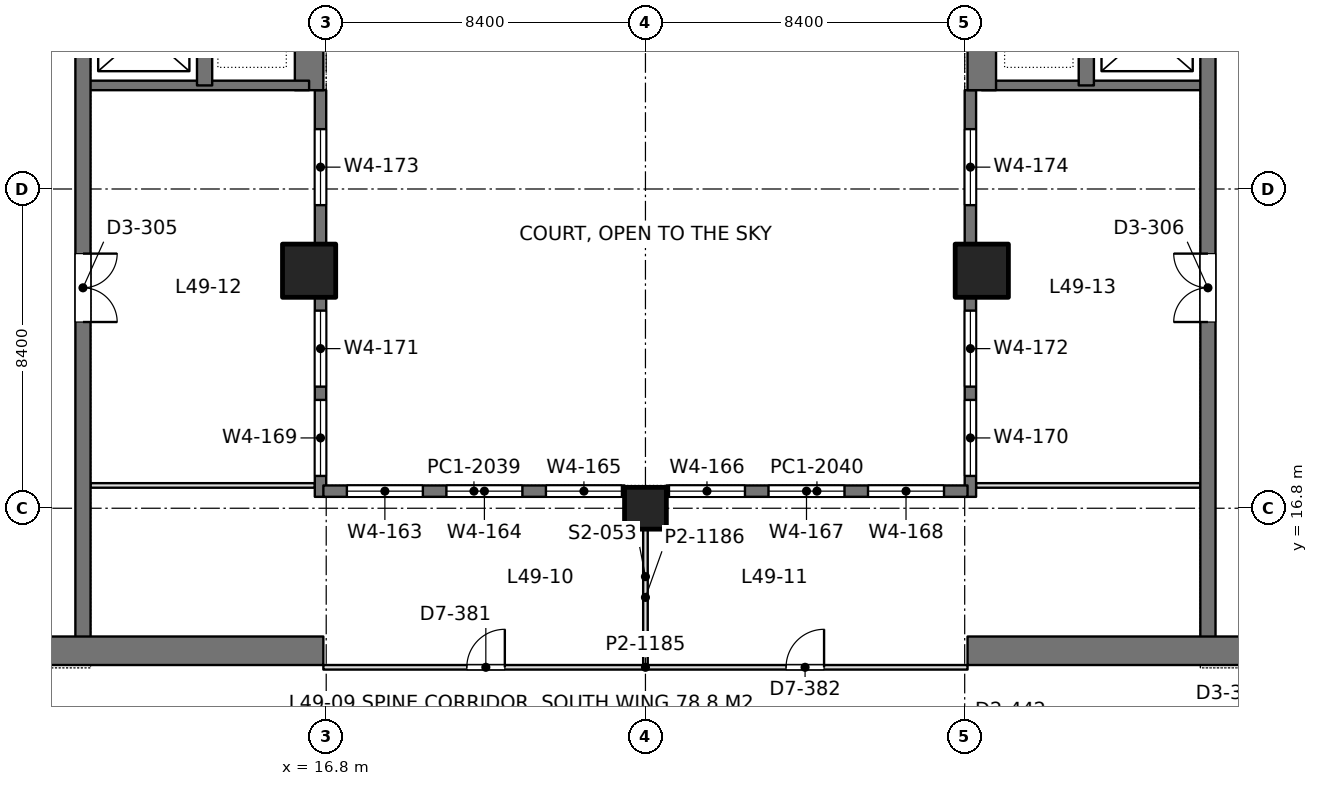
"""IFC4 building model, lengths in metres.
Left out: names, types, materials, properties, quantities, classifications, styles, units other than length and angle.
Written with IfcOpenShell. Run it as: python <this file> out.ifc"""

import sys

from ifc_helpers import new_model, si_unit, direction, frame, frame_2d, origin, origin_2d, place, context, subcontext, project, spatial, rectangle, extrude, element, fill, save


model = new_model("IFC4")
c1 = context("Model", 3, precision=1e-05, world=origin(), true_north=direction((0.0, 1.0)))
c2 = subcontext(c1, "Body", "Model", "MODEL_VIEW")
j1 = project(units=[si_unit("LENGTHUNIT", "METRE"), si_unit("PLANEANGLEUNIT", "RADIAN")], contexts=[c1])
p1 = place(None, origin())
s1 = spatial("IfcSite", under=j1, at=p1, CompositionType="ELEMENT")
p2 = place(p1, origin())
s2 = spatial("IfcBuilding", under=s1, at=p2, CompositionType="ELEMENT")
p3 = place(p2, frame((0.0, 0.0, 215.4)))
s3 = spatial("IfcBuildingStorey", under=s2, at=p3, CompositionType="ELEMENT", Elevation=215.4)
p4 = place(p3, frame((25.2, 16.8, 0.0), z_axis=(0.0, 0.0, 1.0), x_axis=(1.0, 0.0, 0.0)))
e1 = element("IfcColumn", 1, at=p4, inside=s3, PredefinedType="COLUMN", context=c2, shape_type="SweptSolid", body=[
    extrude(rectangle(XDim=1.1, YDim=1.1, at=origin_2d()), origin(), (0.0, 0.0, 1.0), 4.2),
])
for number, where, z_axis, x_axis in (
    (2, (16.35, 23.05, 0.0), (0.0, 0.0, 1.0), (1.0, 0.0, 0.0)),
    (3, (34.05, 23.05, 0.0), (0.0, 0.0, 1.0), (1.0, 0.0, 0.0)),
):
    element("IfcColumn", number, at=place(p3, frame(where, z_axis=z_axis, x_axis=x_axis)), inside=s3, PredefinedType="COLUMN", context=c2, shape_type="SweptSolid", body=[
        extrude(rectangle(XDim=1.4, YDim=1.4, at=origin_2d()), origin(), (0.0, 0.0, 1.0), 4.2),
    ])
p5 = place(p3, frame((-1.125, 13.05, 0.0), z_axis=(0.0, 0.0, 1.0), x_axis=(1.0, 0.0, 0.0)))
e4 = element("IfcWall", 4, at=p5, inside=s3, PredefinedType="SHEAR", context=c2, shape_type="SweptSolid", body=[
    extrude(rectangle(XDim=17.85, YDim=0.75, at=frame_2d((8.925, 0.0))), origin(), (0.0, 0.0, 1.0), 4.2),
])
p6 = place(p5, frame((8.875, 0.0, 0.0)))
e5 = element("IfcOpeningElement", 5, at=p6, cuts=e4, PredefinedType="OPENING", context=c2, shape_type="SweptSolid", body=[
    extrude(rectangle(XDim=1.8, YDim=2.4, at=frame_2d((0.9, 1.2))), frame((0.0, 0.385, 0.0), z_axis=(0.0, -1.0, 0.0), x_axis=(1.0, 0.0, 0.0)), (0.0, 0.0, 1.0), 0.77),
])
p7 = place(p3, frame((16.35, 27.8, 0.0), z_axis=(0.0, 0.0, 1.0), x_axis=(0.0, 1.0, 0.0)))
e6 = element("IfcWall", 6, at=p7, inside=s3, PredefinedType="SHEAR", context=c2, shape_type="SweptSolid", body=[
    extrude(rectangle(XDim=9.55, YDim=0.75, at=frame_2d((4.775, 0.0))), origin(), (0.0, 0.0, 1.0), 4.2),
])
p8 = place(p3, frame((10.4, 13.05, 0.0), z_axis=(0.0, 0.0, 1.0), x_axis=(0.0, 1.0, 0.0)))
e7 = element("IfcWall", 7, at=p8, inside=s3, PredefinedType="SHEAR", context=c2, shape_type="SweptSolid", body=[
    extrude(rectangle(XDim=24.3, YDim=0.4, at=frame_2d((12.15, 0.0))), origin(), (0.0, 0.0, 1.0), 4.2),
])
p9 = place(p8, frame((15.75, 0.0, 0.0)))
e8 = element("IfcOpeningElement", 8, at=p9, cuts=e7, PredefinedType="OPENING", context=c2, shape_type="SweptSolid", body=[
    extrude(rectangle(XDim=1.1, YDim=2.2, at=frame_2d((0.55, 1.1))), frame((0.0, 0.21, 0.0), z_axis=(0.0, -1.0, 0.0), x_axis=(1.0, 0.0, 0.0)), (0.0, 0.0, 1.0), 0.42),
])
p10 = place(p8, frame((18.6, 0.0, 0.0)))
e9 = element("IfcOpeningElement", 9, at=p10, cuts=e7, PredefinedType="OPENING", context=c2, shape_type="SweptSolid", body=[
    extrude(rectangle(XDim=1.1, YDim=2.2, at=frame_2d((0.55, 1.1))), frame((0.0, 0.21, 0.0), z_axis=(0.0, -1.0, 0.0), x_axis=(1.0, 0.0, 0.0)), (0.0, 0.0, 1.0), 0.42),
])
p11 = place(p8, frame((21.45, 0.0, 0.0)))
e10 = element("IfcOpeningElement", 10, at=p11, cuts=e7, PredefinedType="OPENING", context=c2, shape_type="SweptSolid", body=[
    extrude(rectangle(XDim=1.1, YDim=2.2, at=frame_2d((0.55, 1.1))), frame((0.0, 0.21, 0.0), z_axis=(0.0, -1.0, 0.0), x_axis=(1.0, 0.0, 0.0)), (0.0, 0.0, 1.0), 0.42),
])
p12 = place(p8, frame((8.65, 0.0, 0.0)))
e11 = element("IfcOpeningElement", 11, at=p12, cuts=e7, PredefinedType="OPENING", context=c2, shape_type="SweptSolid", body=[
    extrude(rectangle(XDim=1.8, YDim=2.4, at=frame_2d((0.9, 1.2))), frame((0.0, 0.21, 0.0), z_axis=(0.0, -1.0, 0.0), x_axis=(1.0, 0.0, 0.0)), (0.0, 0.0, 1.0), 0.42),
])
p13 = place(p3, frame((13.6, 27.925, 0.0), z_axis=(0.0, 0.0, 1.0), x_axis=(0.0, 1.0, 0.0)))
e12 = element("IfcWall", 12, at=p13, inside=s3, PredefinedType="SHEAR", context=c2, shape_type="SweptSolid", body=[
    extrude(rectangle(XDim=9.425, YDim=0.4, at=frame_2d((4.712, 0.0))), origin(), (0.0, 0.0, 1.0), 4.2),
])
p14 = place(p3, frame((10.4, 27.925, 0.0), z_axis=(0.0, 0.0, 1.0), x_axis=(1.0, 0.0, 0.0)))
e13 = element("IfcWall", 13, at=p14, inside=s3, PredefinedType="SHEAR", context=c2, shape_type="SweptSolid", body=[
    extrude(rectangle(XDim=5.95, YDim=0.25, at=frame_2d((2.975, 0.0))), origin(), (0.0, 0.0, 1.0), 4.2),
])
p15 = place(p3, frame((33.675, 13.05, 0.0), z_axis=(0.0, 0.0, 1.0), x_axis=(1.0, 0.0, 0.0)))
e14 = element("IfcWall", 14, at=p15, inside=s3, PredefinedType="SHEAR", context=c2, shape_type="SweptSolid", body=[
    extrude(rectangle(XDim=17.85, YDim=0.75, at=frame_2d((8.925, 0.0))), origin(), (0.0, 0.0, 1.0), 4.2),
])
p16 = place(p15, frame((7.175, 0.0, 0.0)))
e15 = element("IfcOpeningElement", 15, at=p16, cuts=e14, PredefinedType="OPENING", context=c2, shape_type="SweptSolid", body=[
    extrude(rectangle(XDim=1.8, YDim=2.4, at=frame_2d((0.9, 1.2))), frame((0.0, 0.385, 0.0), z_axis=(0.0, -1.0, 0.0), x_axis=(1.0, 0.0, 0.0)), (0.0, 0.0, 1.0), 0.77),
])
p17 = place(p3, frame((34.05, 27.8, 0.0), z_axis=(0.0, 0.0, 1.0), x_axis=(0.0, 1.0, 0.0)))
e16 = element("IfcWall", 16, at=p17, inside=s3, PredefinedType="SHEAR", context=c2, shape_type="SweptSolid", body=[
    extrude(rectangle(XDim=9.55, YDim=0.75, at=frame_2d((4.775, 0.0))), origin(), (0.0, 0.0, 1.0), 4.2),
])
p18 = place(p3, frame((40.0, 13.05, 0.0), z_axis=(0.0, 0.0, 1.0), x_axis=(0.0, 1.0, 0.0)))
e17 = element("IfcWall", 17, at=p18, inside=s3, PredefinedType="SHEAR", context=c2, shape_type="SweptSolid", body=[
    extrude(rectangle(XDim=24.3, YDim=0.4, at=frame_2d((12.15, 0.0))), origin(), (0.0, 0.0, 1.0), 4.2),
])
p19 = place(p18, frame((15.75, 0.0, 0.0)))
e18 = element("IfcOpeningElement", 18, at=p19, cuts=e17, PredefinedType="OPENING", context=c2, shape_type="SweptSolid", body=[
    extrude(rectangle(XDim=1.1, YDim=2.2, at=frame_2d((0.55, 1.1))), frame((0.0, 0.21, 0.0), z_axis=(0.0, -1.0, 0.0), x_axis=(1.0, 0.0, 0.0)), (0.0, 0.0, 1.0), 0.42),
])
p20 = place(p18, frame((18.6, 0.0, 0.0)))
e19 = element("IfcOpeningElement", 19, at=p20, cuts=e17, PredefinedType="OPENING", context=c2, shape_type="SweptSolid", body=[
    extrude(rectangle(XDim=1.1, YDim=2.2, at=frame_2d((0.55, 1.1))), frame((0.0, 0.21, 0.0), z_axis=(0.0, -1.0, 0.0), x_axis=(1.0, 0.0, 0.0)), (0.0, 0.0, 1.0), 0.42),
])
p21 = place(p18, frame((21.45, 0.0, 0.0)))
e20 = element("IfcOpeningElement", 20, at=p21, cuts=e17, PredefinedType="OPENING", context=c2, shape_type="SweptSolid", body=[
    extrude(rectangle(XDim=1.1, YDim=2.2, at=frame_2d((0.55, 1.1))), frame((0.0, 0.21, 0.0), z_axis=(0.0, -1.0, 0.0), x_axis=(1.0, 0.0, 0.0)), (0.0, 0.0, 1.0), 0.42),
])
p22 = place(p18, frame((8.65, 0.0, 0.0)))
e21 = element("IfcOpeningElement", 21, at=p22, cuts=e17, PredefinedType="OPENING", context=c2, shape_type="SweptSolid", body=[
    extrude(rectangle(XDim=1.8, YDim=2.4, at=frame_2d((0.9, 1.2))), frame((0.0, 0.21, 0.0), z_axis=(0.0, -1.0, 0.0), x_axis=(1.0, 0.0, 0.0)), (0.0, 0.0, 1.0), 0.42),
])
p23 = place(p3, frame((36.8, 27.925, 0.0), z_axis=(0.0, 0.0, 1.0), x_axis=(0.0, 1.0, 0.0)))
e22 = element("IfcWall", 22, at=p23, inside=s3, PredefinedType="SHEAR", context=c2, shape_type="SweptSolid", body=[
    extrude(rectangle(XDim=9.425, YDim=0.4, at=frame_2d((4.712, 0.0))), origin(), (0.0, 0.0, 1.0), 4.2),
])
p24 = place(p3, frame((40.0, 27.925, 0.0), z_axis=(0.0, 0.0, 1.0), x_axis=(-1.0, 0.0, 0.0)))
e23 = element("IfcWall", 23, at=p24, inside=s3, PredefinedType="SHEAR", context=c2, shape_type="SweptSolid", body=[
    extrude(rectangle(XDim=5.95, YDim=0.25, at=frame_2d((2.975, 0.0))), origin(), (0.0, 0.0, 1.0), 4.2),
])
p25 = place(p3, frame((16.65, 17.1, 0.0), z_axis=(0.0, 0.0, 1.0), x_axis=(0.0, 1.0, 0.0)))
e24 = element("IfcWall", 24, at=p25, inside=s3, PredefinedType="SOLIDWALL", context=c2, shape_type="SweptSolid", body=[
    extrude(rectangle(XDim=10.7, YDim=0.3, at=frame_2d((5.35, 0.0))), origin(), (0.0, 0.0, 1.0), 4.05),
])
p26 = place(p25, frame((0.55, 0.0, 0.9)))
e25 = element("IfcOpeningElement", 25, at=p26, cuts=e24, PredefinedType="OPENING", context=c2, shape_type="SweptSolid", body=[
    extrude(rectangle(XDim=2.0, YDim=1.9, at=frame_2d((1.0, 0.95))), frame((0.0, 0.16, 0.0), z_axis=(0.0, -1.0, 0.0), x_axis=(1.0, 0.0, 0.0)), (0.0, 0.0, 1.0), 0.32),
])
p27 = place(p25, frame((2.9, 0.0, 0.9)))
e26 = element("IfcOpeningElement", 26, at=p27, cuts=e24, PredefinedType="OPENING", context=c2, shape_type="SweptSolid", body=[
    extrude(rectangle(XDim=2.0, YDim=1.9, at=frame_2d((1.0, 0.95))), frame((0.0, 0.16, 0.0), z_axis=(0.0, -1.0, 0.0), x_axis=(1.0, 0.0, 0.0)), (0.0, 0.0, 1.0), 0.32),
])
p28 = place(p25, frame((7.675, 0.0, 0.9)))
e27 = element("IfcOpeningElement", 27, at=p28, cuts=e24, PredefinedType="OPENING", context=c2, shape_type="SweptSolid", body=[
    extrude(rectangle(XDim=2.0, YDim=1.9, at=frame_2d((1.0, 0.95))), frame((0.0, 0.16, 0.0), z_axis=(0.0, -1.0, 0.0), x_axis=(1.0, 0.0, 0.0)), (0.0, 0.0, 1.0), 0.32),
])
p29 = place(p3, frame((33.75, 17.1, 0.0), z_axis=(0.0, 0.0, 1.0), x_axis=(0.0, 1.0, 0.0)))
e28 = element("IfcWall", 28, at=p29, inside=s3, PredefinedType="SOLIDWALL", context=c2, shape_type="SweptSolid", body=[
    extrude(rectangle(XDim=10.7, YDim=0.3, at=frame_2d((5.35, 0.0))), origin(), (0.0, 0.0, 1.0), 4.05),
])
p30 = place(p29, frame((0.55, 0.0, 0.9)))
e29 = element("IfcOpeningElement", 29, at=p30, cuts=e28, PredefinedType="OPENING", context=c2, shape_type="SweptSolid", body=[
    extrude(rectangle(XDim=2.0, YDim=1.9, at=frame_2d((1.0, 0.95))), frame((0.0, 0.16, 0.0), z_axis=(0.0, -1.0, 0.0), x_axis=(1.0, 0.0, 0.0)), (0.0, 0.0, 1.0), 0.32),
])
p31 = place(p29, frame((2.9, 0.0, 0.9)))
e30 = element("IfcOpeningElement", 30, at=p31, cuts=e28, PredefinedType="OPENING", context=c2, shape_type="SweptSolid", body=[
    extrude(rectangle(XDim=2.0, YDim=1.9, at=frame_2d((1.0, 0.95))), frame((0.0, 0.16, 0.0), z_axis=(0.0, -1.0, 0.0), x_axis=(1.0, 0.0, 0.0)), (0.0, 0.0, 1.0), 0.32),
])
p32 = place(p29, frame((7.675, 0.0, 0.9)))
e31 = element("IfcOpeningElement", 31, at=p32, cuts=e28, PredefinedType="OPENING", context=c2, shape_type="SweptSolid", body=[
    extrude(rectangle(XDim=2.0, YDim=1.9, at=frame_2d((1.0, 0.95))), frame((0.0, 0.16, 0.0), z_axis=(0.0, -1.0, 0.0), x_axis=(1.0, 0.0, 0.0)), (0.0, 0.0, 1.0), 0.32),
])
p33 = place(p3, frame((16.725, 17.25, 0.0), z_axis=(0.0, 0.0, 1.0), x_axis=(1.0, 0.0, 0.0)))
e32 = element("IfcWall", 32, at=p33, inside=s3, PredefinedType="SOLIDWALL", context=c2, shape_type="SweptSolid", body=[
    extrude(rectangle(XDim=7.925, YDim=0.3, at=frame_2d((3.962, 0.0))), origin(), (0.0, 0.0, 1.0), 4.05),
])
p34 = place(p33, frame((0.619, 0.0, 0.9)))
e33 = element("IfcOpeningElement", 33, at=p34, cuts=e32, PredefinedType="OPENING", context=c2, shape_type="SweptSolid", body=[
    extrude(rectangle(XDim=2.0, YDim=1.9, at=frame_2d((1.0, 0.95))), frame((0.0, 0.16, 0.0), z_axis=(0.0, -1.0, 0.0), x_axis=(1.0, 0.0, 0.0)), (0.0, 0.0, 1.0), 0.32),
])
p35 = place(p33, frame((3.238, 0.0, 0.9)))
e34 = element("IfcOpeningElement", 34, at=p35, cuts=e32, PredefinedType="OPENING", context=c2, shape_type="SweptSolid", body=[
    extrude(rectangle(XDim=2.0, YDim=1.9, at=frame_2d((1.0, 0.95))), frame((0.0, 0.16, 0.0), z_axis=(0.0, -1.0, 0.0), x_axis=(1.0, 0.0, 0.0)), (0.0, 0.0, 1.0), 0.32),
])
p36 = place(p33, frame((5.856, 0.0, 0.9)))
e35 = element("IfcOpeningElement", 35, at=p36, cuts=e32, PredefinedType="OPENING", context=c2, shape_type="SweptSolid", body=[
    extrude(rectangle(XDim=2.0, YDim=1.9, at=frame_2d((1.0, 0.95))), frame((0.0, 0.16, 0.0), z_axis=(0.0, -1.0, 0.0), x_axis=(1.0, 0.0, 0.0)), (0.0, 0.0, 1.0), 0.32),
])
p37 = place(p3, frame((25.75, 17.25, 0.0), z_axis=(0.0, 0.0, 1.0), x_axis=(1.0, 0.0, 0.0)))
e36 = element("IfcWall", 36, at=p37, inside=s3, PredefinedType="SOLIDWALL", context=c2, shape_type="SweptSolid", body=[
    extrude(rectangle(XDim=7.925, YDim=0.3, at=frame_2d((3.962, 0.0))), origin(), (0.0, 0.0, 1.0), 4.05),
])
p38 = place(p37, frame((0.069, 0.0, 0.9)))
e37 = element("IfcOpeningElement", 37, at=p38, cuts=e36, PredefinedType="OPENING", context=c2, shape_type="SweptSolid", body=[
    extrude(rectangle(XDim=2.0, YDim=1.9, at=frame_2d((1.0, 0.95))), frame((0.0, 0.16, 0.0), z_axis=(0.0, -1.0, 0.0), x_axis=(1.0, 0.0, 0.0)), (0.0, 0.0, 1.0), 0.32),
])
p39 = place(p37, frame((2.688, 0.0, 0.9)))
e38 = element("IfcOpeningElement", 38, at=p39, cuts=e36, PredefinedType="OPENING", context=c2, shape_type="SweptSolid", body=[
    extrude(rectangle(XDim=2.0, YDim=1.9, at=frame_2d((1.0, 0.95))), frame((0.0, 0.16, 0.0), z_axis=(0.0, -1.0, 0.0), x_axis=(1.0, 0.0, 0.0)), (0.0, 0.0, 1.0), 0.32),
])
p40 = place(p37, frame((5.306, 0.0, 0.9)))
e39 = element("IfcOpeningElement", 39, at=p40, cuts=e36, PredefinedType="OPENING", context=c2, shape_type="SweptSolid", body=[
    extrude(rectangle(XDim=2.0, YDim=1.9, at=frame_2d((1.0, 0.95))), frame((0.0, 0.16, 0.0), z_axis=(0.0, -1.0, 0.0), x_axis=(1.0, 0.0, 0.0)), (0.0, 0.0, 1.0), 0.32),
])
for number, where, z_axis, x_axis in (
    (40, (10.598, 17.4, 0.0), (0.0, 0.0, 1.0), (1.0, 0.0, 0.0)),
    (41, (33.898, 17.4, 0.0), (0.0, 0.0, 1.0), (1.0, 0.0, 0.0)),
):
    element("IfcWall", number, at=place(p3, frame(where, z_axis=z_axis, x_axis=x_axis)), inside=s3, PredefinedType="PARTITIONING", context=c2, shape_type="SweptSolid", body=[
        extrude(rectangle(XDim=5.904, YDim=0.12, at=frame_2d((2.952, 0.0))), origin(), (0.0, 0.0, 1.0), 3.55),
    ])
p41 = place(p3, frame((25.2, 12.658, 0.0), z_axis=(0.0, 0.0, 1.0), x_axis=(0.0, 1.0, 0.0)))
e42 = element("IfcWall", 42, at=p41, inside=s3, PredefinedType="PARTITIONING", context=c2, shape_type="SweptSolid", body=[
    extrude(rectangle(XDim=3.593, YDim=0.12, at=frame_2d((1.796, 0.0))), origin(), (0.0, 0.0, 1.0), 3.55),
])
p42 = place(p3, frame((16.725, 12.615, 0.0), z_axis=(0.0, 0.0, 1.0), x_axis=(1.0, 0.0, 0.0)))
e43 = element("IfcWall", 43, at=p42, inside=s3, PredefinedType="PARTITIONING", context=c2, shape_type="SweptSolid", body=[
    extrude(rectangle(XDim=16.95, YDim=0.12, at=frame_2d((8.475, 0.0))), origin(), (0.0, 0.0, 1.0), 3.55),
])
p43 = place(p42, frame((3.775, 0.0, 0.0)))
e44 = element("IfcOpeningElement", 44, at=p43, cuts=e43, PredefinedType="OPENING", context=c2, shape_type="SweptSolid", body=[
    extrude(rectangle(XDim=1.0, YDim=2.4, at=frame_2d((0.5, 1.2))), frame((0.0, 0.07, 0.0), z_axis=(0.0, -1.0, 0.0), x_axis=(1.0, 0.0, 0.0)), (0.0, 0.0, 1.0), 0.14),
])
p44 = place(p42, frame((12.175, 0.0, 0.0)))
e45 = element("IfcOpeningElement", 45, at=p44, cuts=e43, PredefinedType="OPENING", context=c2, shape_type="SweptSolid", body=[
    extrude(rectangle(XDim=1.0, YDim=2.4, at=frame_2d((0.5, 1.2))), frame((0.0, 0.07, 0.0), z_axis=(0.0, -1.0, 0.0), x_axis=(1.0, 0.0, 0.0)), (0.0, 0.0, 1.0), 0.14),
])
p45 = place(p26, origin())
e46 = element("IfcWindow", 46, at=p45, inside=s3, PartitioningType="SINGLE_PANEL", PredefinedType="WINDOW", context=c2, shape_type="SweptSolid", body=[
    extrude(rectangle(XDim=2.0, YDim=1.9, at=frame_2d((1.0, 0.95))), frame((0.0, 0.03, 0.0), z_axis=(0.0, -1.0, 0.0), x_axis=(1.0, 0.0, 0.0)), (0.0, 0.0, 1.0), 0.06),
])
fill(e25, e46)
p46 = place(p27, origin())
e47 = element("IfcWindow", 47, at=p46, inside=s3, PartitioningType="SINGLE_PANEL", PredefinedType="WINDOW", context=c2, shape_type="SweptSolid", body=[
    extrude(rectangle(XDim=2.0, YDim=1.9, at=frame_2d((1.0, 0.95))), frame((0.0, 0.03, 0.0), z_axis=(0.0, -1.0, 0.0), x_axis=(1.0, 0.0, 0.0)), (0.0, 0.0, 1.0), 0.06),
])
fill(e26, e47)
p47 = place(p28, origin())
e48 = element("IfcWindow", 48, at=p47, inside=s3, PartitioningType="SINGLE_PANEL", PredefinedType="WINDOW", context=c2, shape_type="SweptSolid", body=[
    extrude(rectangle(XDim=2.0, YDim=1.9, at=frame_2d((1.0, 0.95))), frame((0.0, 0.03, 0.0), z_axis=(0.0, -1.0, 0.0), x_axis=(1.0, 0.0, 0.0)), (0.0, 0.0, 1.0), 0.06),
])
fill(e27, e48)
p48 = place(p30, origin())
e49 = element("IfcWindow", 49, at=p48, inside=s3, PartitioningType="SINGLE_PANEL", PredefinedType="WINDOW", context=c2, shape_type="SweptSolid", body=[
    extrude(rectangle(XDim=2.0, YDim=1.9, at=frame_2d((1.0, 0.95))), frame((0.0, 0.03, 0.0), z_axis=(0.0, -1.0, 0.0), x_axis=(1.0, 0.0, 0.0)), (0.0, 0.0, 1.0), 0.06),
])
fill(e29, e49)
p49 = place(p31, origin())
e50 = element("IfcWindow", 50, at=p49, inside=s3, PartitioningType="SINGLE_PANEL", PredefinedType="WINDOW", context=c2, shape_type="SweptSolid", body=[
    extrude(rectangle(XDim=2.0, YDim=1.9, at=frame_2d((1.0, 0.95))), frame((0.0, 0.03, 0.0), z_axis=(0.0, -1.0, 0.0), x_axis=(1.0, 0.0, 0.0)), (0.0, 0.0, 1.0), 0.06),
])
fill(e30, e50)
p50 = place(p32, origin())
e51 = element("IfcWindow", 51, at=p50, inside=s3, PartitioningType="SINGLE_PANEL", PredefinedType="WINDOW", context=c2, shape_type="SweptSolid", body=[
    extrude(rectangle(XDim=2.0, YDim=1.9, at=frame_2d((1.0, 0.95))), frame((0.0, 0.03, 0.0), z_axis=(0.0, -1.0, 0.0), x_axis=(1.0, 0.0, 0.0)), (0.0, 0.0, 1.0), 0.06),
])
fill(e31, e51)
p51 = place(p34, origin())
e52 = element("IfcWindow", 52, at=p51, inside=s3, PartitioningType="SINGLE_PANEL", PredefinedType="WINDOW", context=c2, shape_type="SweptSolid", body=[
    extrude(rectangle(XDim=2.0, YDim=1.9, at=frame_2d((1.0, 0.95))), frame((0.0, 0.03, 0.0), z_axis=(0.0, -1.0, 0.0), x_axis=(1.0, 0.0, 0.0)), (0.0, 0.0, 1.0), 0.06),
])
fill(e33, e52)
p52 = place(p35, origin())
e53 = element("IfcWindow", 53, at=p52, inside=s3, PartitioningType="SINGLE_PANEL", PredefinedType="WINDOW", context=c2, shape_type="SweptSolid", body=[
    extrude(rectangle(XDim=2.0, YDim=1.9, at=frame_2d((1.0, 0.95))), frame((0.0, 0.03, 0.0), z_axis=(0.0, -1.0, 0.0), x_axis=(1.0, 0.0, 0.0)), (0.0, 0.0, 1.0), 0.06),
])
fill(e34, e53)
p53 = place(p36, origin())
e54 = element("IfcWindow", 54, at=p53, inside=s3, PartitioningType="SINGLE_PANEL", PredefinedType="WINDOW", context=c2, shape_type="SweptSolid", body=[
    extrude(rectangle(XDim=2.0, YDim=1.9, at=frame_2d((1.0, 0.95))), frame((0.0, 0.03, 0.0), z_axis=(0.0, -1.0, 0.0), x_axis=(1.0, 0.0, 0.0)), (0.0, 0.0, 1.0), 0.06),
])
fill(e35, e54)
p54 = place(p38, origin())
e55 = element("IfcWindow", 55, at=p54, inside=s3, PartitioningType="SINGLE_PANEL", PredefinedType="WINDOW", context=c2, shape_type="SweptSolid", body=[
    extrude(rectangle(XDim=2.0, YDim=1.9, at=frame_2d((1.0, 0.95))), frame((0.0, 0.03, 0.0), z_axis=(0.0, -1.0, 0.0), x_axis=(1.0, 0.0, 0.0)), (0.0, 0.0, 1.0), 0.06),
])
fill(e37, e55)
p55 = place(p39, origin())
e56 = element("IfcWindow", 56, at=p55, inside=s3, PartitioningType="SINGLE_PANEL", PredefinedType="WINDOW", context=c2, shape_type="SweptSolid", body=[
    extrude(rectangle(XDim=2.0, YDim=1.9, at=frame_2d((1.0, 0.95))), frame((0.0, 0.03, 0.0), z_axis=(0.0, -1.0, 0.0), x_axis=(1.0, 0.0, 0.0)), (0.0, 0.0, 1.0), 0.06),
])
fill(e38, e56)
p56 = place(p40, origin())
e57 = element("IfcWindow", 57, at=p56, inside=s3, PartitioningType="SINGLE_PANEL", PredefinedType="WINDOW", context=c2, shape_type="SweptSolid", body=[
    extrude(rectangle(XDim=2.0, YDim=1.9, at=frame_2d((1.0, 0.95))), frame((0.0, 0.03, 0.0), z_axis=(0.0, -1.0, 0.0), x_axis=(1.0, 0.0, 0.0)), (0.0, 0.0, 1.0), 0.06),
])
fill(e39, e57)
p57 = place(p12, frame((1.8, 0.0, 0.0), z_axis=(0.0, 0.0, 1.0), x_axis=(-1.0, 0.0, 0.0)))
e58 = element("IfcDoor", 58, at=p57, inside=s3, OperationType="DOUBLE_DOOR_SINGLE_SWING", PredefinedType="DOOR", context=c2, shape_type="SweptSolid", body=[
    extrude(rectangle(XDim=1.8, YDim=2.4, at=frame_2d((0.9, 1.2))), frame((0.0, 0.025, 0.0), z_axis=(0.0, -1.0, 0.0), x_axis=(1.0, 0.0, 0.0)), (0.0, 0.0, 1.0), 0.05),
])
fill(e11, e58)
p58 = place(p22, origin())
e59 = element("IfcDoor", 59, at=p58, inside=s3, OperationType="DOUBLE_DOOR_SINGLE_SWING", PredefinedType="DOOR", context=c2, shape_type="SweptSolid", body=[
    extrude(rectangle(XDim=1.8, YDim=2.4, at=frame_2d((0.9, 1.2))), frame((0.0, 0.025, 0.0), z_axis=(0.0, -1.0, 0.0), x_axis=(1.0, 0.0, 0.0)), (0.0, 0.0, 1.0), 0.05),
])
fill(e21, e59)
p59 = place(p43, origin())
e60 = element("IfcDoor", 60, at=p59, inside=s3, OperationType="SINGLE_SWING_RIGHT", PredefinedType="DOOR", context=c2, shape_type="SweptSolid", body=[
    extrude(rectangle(XDim=1.0, YDim=2.4, at=frame_2d((0.5, 1.2))), frame((0.0, 0.025, 0.0), z_axis=(0.0, -1.0, 0.0), x_axis=(1.0, 0.0, 0.0)), (0.0, 0.0, 1.0), 0.05),
])
fill(e44, e60)
p60 = place(p44, origin())
e61 = element("IfcDoor", 61, at=p60, inside=s3, OperationType="SINGLE_SWING_RIGHT", PredefinedType="DOOR", context=c2, shape_type="SweptSolid", body=[
    extrude(rectangle(XDim=1.0, YDim=2.4, at=frame_2d((0.5, 1.2))), frame((0.0, 0.025, 0.0), z_axis=(0.0, -1.0, 0.0), x_axis=(1.0, 0.0, 0.0)), (0.0, 0.0, 1.0), 0.05),
])
fill(e45, e61)
save(model, sys.argv[1])
